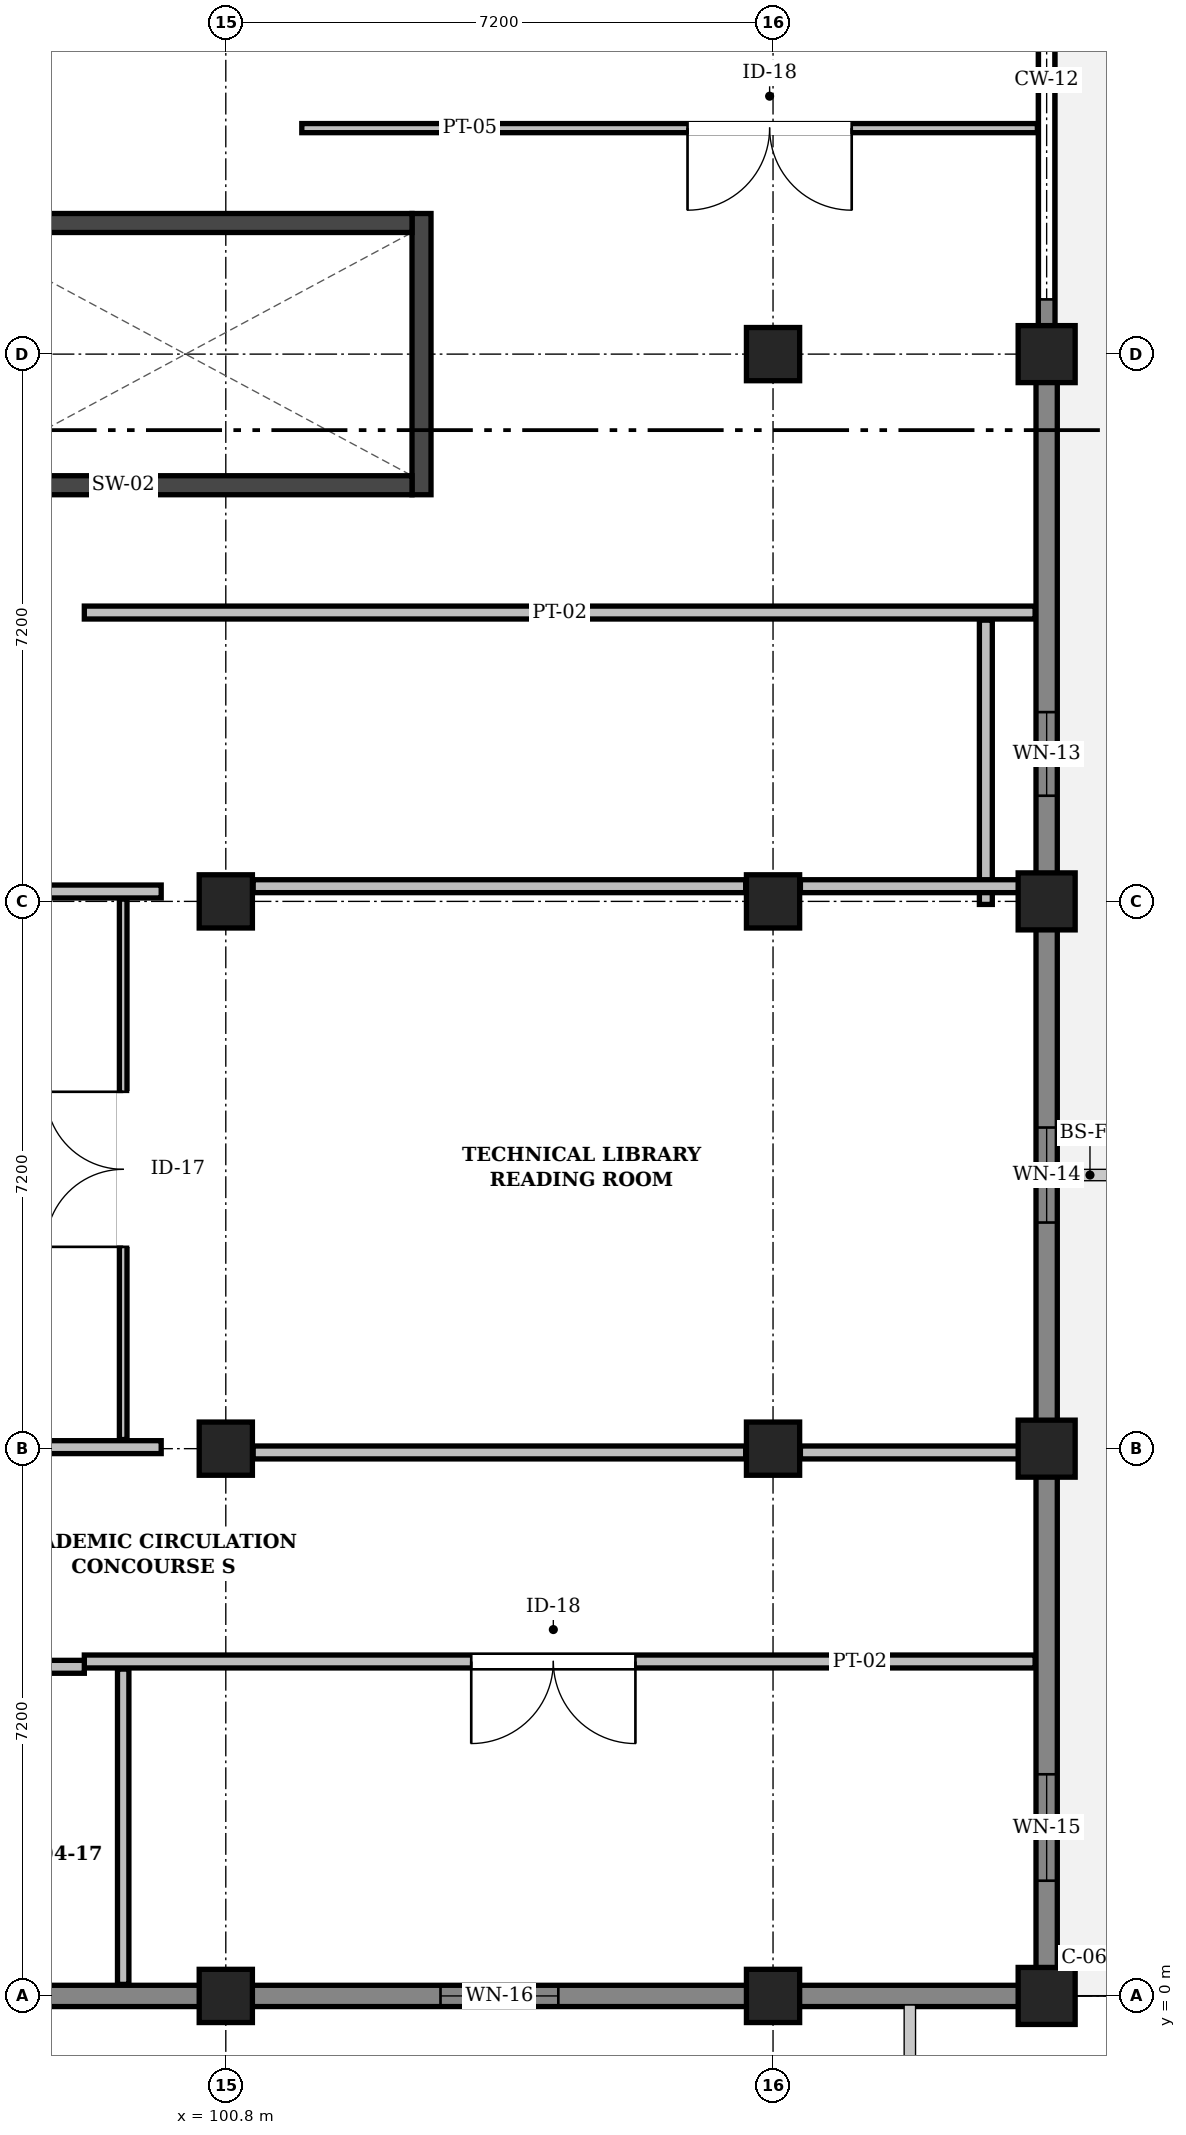
"""IFC4 building model, lengths in metres.
Left out: names, types, materials, properties, quantities, classifications, styles, units other than length and angle.
Written with IfcOpenShell. Run it as: python <this file> out.ifc"""

import sys

from ifc_helpers import new_model, si_unit, direction, frame, frame_2d, origin, origin_2d, place, context, subcontext, project, spatial, rectangle, extrude, element, fill, save


model = new_model("IFC4")
c1 = context("Model", 3, precision=1e-05, world=origin(), true_north=direction((0.0, 1.0)))
c2 = subcontext(c1, "Body", "Model", "MODEL_VIEW")
j1 = project(units=[si_unit("LENGTHUNIT", "METRE"), si_unit("PLANEANGLEUNIT", "RADIAN")], contexts=[c1])
p1 = place(None, origin())
s1 = spatial("IfcSite", under=j1, at=p1, CompositionType="ELEMENT")
p2 = place(p1, origin())
s2 = spatial("IfcBuilding", under=s1, at=p2, CompositionType="ELEMENT")
p3 = place(p2, frame((0.0, 0.0, 18.9)))
s3 = spatial("IfcBuildingStorey", under=s2, at=p3, CompositionType="ELEMENT", Elevation=18.9)
for number, where, z_axis, x_axis in (
    (1, (100.8, 0.0, 0.0), (0.0, 0.0, 1.0), (1.0, 0.0, 0.0)),
    (2, (100.8, 7.2, 0.0), (0.0, 0.0, 1.0), (1.0, 0.0, 0.0)),
    (3, (100.8, 14.4, 0.0), (0.0, 0.0, 1.0), (1.0, 0.0, 0.0)),
    (4, (108.0, 0.0, 0.0), (0.0, 0.0, 1.0), (1.0, 0.0, 0.0)),
    (5, (108.0, 7.2, 0.0), (0.0, 0.0, 1.0), (1.0, 0.0, 0.0)),
    (6, (108.0, 14.4, 0.0), (0.0, 0.0, 1.0), (1.0, 0.0, 0.0)),
    (7, (108.0, 21.6, 0.0), (0.0, 0.0, 1.0), (1.0, 0.0, 0.0)),
):
    element("IfcColumn", number, at=place(p3, frame(where, z_axis=z_axis, x_axis=x_axis)), inside=s3, PredefinedType="COLUMN", context=c2, shape_type="SweptSolid", body=[
        extrude(rectangle(XDim=0.7, YDim=0.7, at=origin_2d()), origin(), (0.0, 0.0, 1.0), 4.5),
    ])
for number, where, z_axis, x_axis in (
    (8, (111.6, 0.0, 0.0), (0.0, 0.0, 1.0), (1.0, 0.0, 0.0)),
    (9, (111.6, 7.2, 0.0), (0.0, 0.0, 1.0), (1.0, 0.0, 0.0)),
    (10, (111.6, 14.4, 0.0), (0.0, 0.0, 1.0), (1.0, 0.0, 0.0)),
    (11, (111.6, 21.6, 0.0), (0.0, 0.0, 1.0), (1.0, 0.0, 0.0)),
):
    element("IfcColumn", number, at=place(p3, frame(where, z_axis=z_axis, x_axis=x_axis)), inside=s3, PredefinedType="COLUMN", context=c2, shape_type="SweptSolid", body=[
        extrude(rectangle(XDim=0.75, YDim=0.75, at=origin_2d()), origin(), (0.0, 0.0, 1.0), 4.5),
    ])
p4 = place(p3, frame((111.6, 28.648, 0.0), z_axis=(0.0, 0.0, 1.0), x_axis=(0.0, -1.0, 0.0)))
e12 = element("IfcWall", 12, at=p4, inside=s3, PredefinedType="SOLIDWALL", context=c2, shape_type="SweptSolid", body=[
    extrude(rectangle(XDim=7.048, YDim=0.22, at=frame_2d((3.524, 0.0))), origin(), (0.0, 0.0, 1.0), 1.24),
])
p5 = place(p3, frame((111.6, 21.6, 0.0), z_axis=(0.0, 0.0, 1.0), x_axis=(0.0, -1.0, 0.0)))
e13 = element("IfcWall", 13, at=p5, inside=s3, PredefinedType="SOLIDWALL", context=c2, shape_type="SweptSolid", body=[
    extrude(rectangle(XDim=7.2, YDim=0.28, at=frame_2d((3.6, 0.0))), origin(), (0.0, 0.0, 1.0), 4.22),
])
p6 = place(p5, frame((4.71, 0.0, 0.95)))
e14 = element("IfcOpeningElement", 14, at=p6, cuts=e13, PredefinedType="OPENING", context=c2, shape_type="SweptSolid", body=[
    extrude(rectangle(XDim=1.1, YDim=1.55, at=frame_2d((0.55, 0.775))), frame((0.0, 0.152, 0.0), z_axis=(0.0, -1.0, 0.0), x_axis=(1.0, 0.0, 0.0)), (0.0, 0.0, 1.0), 0.304),
])
p7 = place(p3, frame((111.6, 14.4, 0.0), z_axis=(0.0, 0.0, 1.0), x_axis=(0.0, -1.0, 0.0)))
e15 = element("IfcWall", 15, at=p7, inside=s3, PredefinedType="SOLIDWALL", context=c2, shape_type="SweptSolid", body=[
    extrude(rectangle(XDim=7.2, YDim=0.28, at=frame_2d((3.6, 0.0))), origin(), (0.0, 0.0, 1.0), 4.22),
])
p8 = place(p7, frame((2.975, 0.0, 0.95)))
e16 = element("IfcOpeningElement", 16, at=p8, cuts=e15, PredefinedType="OPENING", context=c2, shape_type="SweptSolid", body=[
    extrude(rectangle(XDim=1.25, YDim=1.55, at=frame_2d((0.625, 0.775))), frame((0.0, 0.152, 0.0), z_axis=(0.0, -1.0, 0.0), x_axis=(1.0, 0.0, 0.0)), (0.0, 0.0, 1.0), 0.304),
])
p9 = place(p3, frame((111.6, 7.2, 0.0), z_axis=(0.0, 0.0, 1.0), x_axis=(0.0, -1.0, 0.0)))
e17 = element("IfcWall", 17, at=p9, inside=s3, PredefinedType="SOLIDWALL", context=c2, shape_type="SweptSolid", body=[
    extrude(rectangle(XDim=7.048, YDim=0.28, at=frame_2d((3.524, 0.0))), origin(), (0.0, 0.0, 1.0), 4.22),
])
p10 = place(p9, frame((4.284, 0.0, 0.95)))
e18 = element("IfcOpeningElement", 18, at=p10, cuts=e17, PredefinedType="OPENING", context=c2, shape_type="SweptSolid", body=[
    extrude(rectangle(XDim=1.4, YDim=1.55, at=frame_2d((0.7, 0.775))), frame((0.0, 0.152, 0.0), z_axis=(0.0, -1.0, 0.0), x_axis=(1.0, 0.0, 0.0)), (0.0, 0.0, 1.0), 0.304),
])
p11 = place(p3, frame((111.75, 0.0, 0.0), z_axis=(0.0, 0.0, 1.0), x_axis=(-1.0, 0.0, 0.0)))
e19 = element("IfcWall", 19, at=p11, inside=s3, PredefinedType="SOLIDWALL", context=c2, shape_type="SweptSolid", body=[
    extrude(rectangle(XDim=3.75, YDim=0.28, at=frame_2d((1.875, 0.0))), origin(), (0.0, 0.0, 1.0), 4.22),
])
p12 = place(p3, frame((108.0, 0.0, 0.0), z_axis=(0.0, 0.0, 1.0), x_axis=(-1.0, 0.0, 0.0)))
e20 = element("IfcWall", 20, at=p12, inside=s3, PredefinedType="SOLIDWALL", context=c2, shape_type="SweptSolid", body=[
    extrude(rectangle(XDim=7.2, YDim=0.28, at=frame_2d((3.6, 0.0))), origin(), (0.0, 0.0, 1.0), 4.22),
])
p13 = place(p12, frame((2.825, 0.0, 0.95)))
e21 = element("IfcOpeningElement", 21, at=p13, cuts=e20, PredefinedType="OPENING", context=c2, shape_type="SweptSolid", body=[
    extrude(rectangle(XDim=1.55, YDim=1.55, at=frame_2d((0.775, 0.775))), frame((0.0, 0.152, 0.0), z_axis=(0.0, -1.0, 0.0), x_axis=(1.0, 0.0, 0.0)), (0.0, 0.0, 1.0), 0.304),
])
p14 = place(p3, frame((100.8, 0.0, 0.0), z_axis=(0.0, 0.0, 1.0), x_axis=(-1.0, 0.0, 0.0)))
e22 = element("IfcWall", 22, at=p14, inside=s3, PredefinedType="SOLIDWALL", context=c2, shape_type="SweptSolid", body=[
    extrude(rectangle(XDim=7.2, YDim=0.28, at=frame_2d((3.6, 0.0))), origin(), (0.0, 0.0, 1.0), 4.22),
])
p15 = place(p14, frame((3.06, 0.0, 0.95)))
e23 = element("IfcOpeningElement", 23, at=p15, cuts=e22, PredefinedType="OPENING", context=c2, shape_type="SweptSolid", body=[
    extrude(rectangle(XDim=1.7, YDim=1.55, at=frame_2d((0.85, 0.775))), frame((0.0, 0.152, 0.0), z_axis=(0.0, -1.0, 0.0), x_axis=(1.0, 0.0, 0.0)), (0.0, 0.0, 1.0), 0.304),
])
p16 = place(p3, frame((103.375, 19.75, 0.0), z_axis=(0.0, 0.0, 1.0), x_axis=(0.0, 1.0, 0.0)))
e24 = element("IfcWall", 24, at=p16, inside=s3, PredefinedType="SHEAR", context=c2, shape_type="SweptSolid", body=[
    extrude(rectangle(XDim=3.7, YDim=0.25, at=frame_2d((1.85, 0.0))), origin(), (0.0, 0.0, 1.0), 4.25),
])
for number, where, z_axis, x_axis in (
    (25, (95.65, 19.875, 0.0), (0.0, 0.0, 1.0), (1.0, 0.0, 0.0)),
    (26, (95.65, 23.325, 0.0), (0.0, 0.0, 1.0), (1.0, 0.0, 0.0)),
):
    element("IfcWall", number, at=place(p3, frame(where, z_axis=z_axis, x_axis=x_axis)), inside=s3, PredefinedType="SHEAR", context=c2, shape_type="SweptSolid", body=[
        extrude(rectangle(XDim=7.6, YDim=0.25, at=frame_2d((3.8, 0.0))), origin(), (0.0, 0.0, 1.0), 4.25),
    ])
p17 = place(p3, frame((98.938, 18.2, 0.0), z_axis=(0.0, 0.0, 1.0), x_axis=(1.0, 0.0, 0.0)))
e27 = element("IfcWall", 27, at=p17, inside=s3, PredefinedType="PARTITIONING", context=c2, shape_type="SweptSolid", body=[
    extrude(rectangle(XDim=12.51, YDim=0.17, at=frame_2d((6.255, 0.0))), origin(), (0.0, 0.0, 1.0), 4.16),
])
p18 = place(p3, frame((110.8, 14.36, 0.0), z_axis=(0.0, 0.0, 1.0), x_axis=(0.0, 1.0, 0.0)))
e28 = element("IfcWall", 28, at=p18, inside=s3, PredefinedType="PARTITIONING", context=c2, shape_type="SweptSolid", body=[
    extrude(rectangle(XDim=3.74, YDim=0.17, at=frame_2d((1.87, 0.0))), origin(), (0.0, 0.0, 1.0), 4.16),
])
p19 = place(p3, frame((101.16, 14.6, 0.0), z_axis=(0.0, 0.0, 1.0), x_axis=(1.0, 0.0, 0.0)))
e29 = element("IfcWall", 29, at=p19, inside=s3, PredefinedType="PARTITIONING", context=c2, shape_type="SweptSolid", body=[
    extrude(rectangle(XDim=6.48, YDim=0.17, at=frame_2d((3.24, 0.0))), origin(), (0.0, 0.0, 1.0), 3.73),
])
p20 = place(p3, frame((108.36, 14.6, 0.0), z_axis=(0.0, 0.0, 1.0), x_axis=(1.0, 0.0, 0.0)))
e30 = element("IfcWall", 30, at=p20, inside=s3, PredefinedType="PARTITIONING", context=c2, shape_type="SweptSolid", body=[
    extrude(rectangle(XDim=3.088, YDim=0.17, at=frame_2d((1.544, 0.0))), origin(), (0.0, 0.0, 1.0), 3.73),
])
p21 = place(p3, frame((93.96, 14.53, 0.0), z_axis=(0.0, 0.0, 1.0), x_axis=(1.0, 0.0, 0.0)))
e31 = element("IfcWall", 31, at=p21, inside=s3, PredefinedType="PARTITIONING", context=c2, shape_type="SweptSolid", body=[
    extrude(rectangle(XDim=5.99, YDim=0.17, at=frame_2d((2.995, 0.0))), origin(), (0.0, 0.0, 1.0), 3.73),
])
p22 = place(p3, frame((98.938, 4.4, 0.0), z_axis=(0.0, 0.0, 1.0), x_axis=(1.0, 0.0, 0.0)))
e32 = element("IfcWall", 32, at=p22, inside=s3, PredefinedType="PARTITIONING", context=c2, shape_type="SweptSolid", body=[
    extrude(rectangle(XDim=12.51, YDim=0.17, at=frame_2d((6.255, 0.0))), origin(), (0.0, 0.0, 1.0), 4.16),
])
p23 = place(p22, frame((5.091, 0.0, 0.0)))
e33 = element("IfcOpeningElement", 33, at=p23, cuts=e32, PredefinedType="OPENING", context=c2, shape_type="SweptSolid", body=[
    extrude(rectangle(XDim=2.16, YDim=2.35, at=frame_2d((1.08, 1.175))), frame((0.0, 0.097, 0.0), z_axis=(0.0, -1.0, 0.0), x_axis=(1.0, 0.0, 0.0)), (0.0, 0.0, 1.0), 0.194),
])
p24 = place(p3, frame((101.16, 7.15, 0.0), z_axis=(0.0, 0.0, 1.0), x_axis=(1.0, 0.0, 0.0)))
e34 = element("IfcWall", 34, at=p24, inside=s3, PredefinedType="PARTITIONING", context=c2, shape_type="SweptSolid", body=[
    extrude(rectangle(XDim=6.48, YDim=0.17, at=frame_2d((3.24, 0.0))), origin(), (0.0, 0.0, 1.0), 3.73),
])
p25 = place(p3, frame((108.36, 7.15, 0.0), z_axis=(0.0, 0.0, 1.0), x_axis=(1.0, 0.0, 0.0)))
e35 = element("IfcWall", 35, at=p25, inside=s3, PredefinedType="PARTITIONING", context=c2, shape_type="SweptSolid", body=[
    extrude(rectangle(XDim=3.088, YDim=0.17, at=frame_2d((1.544, 0.0))), origin(), (0.0, 0.0, 1.0), 3.73),
])
p26 = place(p3, frame((93.96, 7.22, 0.0), z_axis=(0.0, 0.0, 1.0), x_axis=(1.0, 0.0, 0.0)))
e36 = element("IfcWall", 36, at=p26, inside=s3, PredefinedType="PARTITIONING", context=c2, shape_type="SweptSolid", body=[
    extrude(rectangle(XDim=5.99, YDim=0.17, at=frame_2d((2.995, 0.0))), origin(), (0.0, 0.0, 1.0), 3.73),
])
p27 = place(p3, frame((94.95, 4.33, 0.0), z_axis=(0.0, 0.0, 1.0), x_axis=(1.0, 0.0, 0.0)))
e37 = element("IfcWall", 37, at=p27, inside=s3, PredefinedType="PARTITIONING", context=c2, shape_type="SweptSolid", body=[
    extrude(rectangle(XDim=3.989, YDim=0.17, at=frame_2d((1.994, 0.0))), origin(), (0.0, 0.0, 1.0), 4.16),
])
p28 = place(p27, frame((1.214, 0.0, 0.0)))
e38 = element("IfcOpeningElement", 38, at=p28, cuts=e37, PredefinedType="OPENING", context=c2, shape_type="SweptSolid", body=[
    extrude(rectangle(XDim=1.56, YDim=2.26, at=frame_2d((0.78, 1.13))), frame((0.0, 0.097, 0.0), z_axis=(0.0, -1.0, 0.0), x_axis=(1.0, 0.0, 0.0)), (0.0, 0.0, 1.0), 0.194),
])
p29 = place(p3, frame((99.45, 7.32, 0.0), z_axis=(0.0, 0.0, 1.0), x_axis=(0.0, 1.0, 0.0)))
e39 = element("IfcWall", 39, at=p29, inside=s3, PredefinedType="PARTITIONING", context=c2, shape_type="SweptSolid", body=[
    extrude(rectangle(XDim=7.11, YDim=0.1, at=frame_2d((3.555, 0.0))), origin(), (0.0, 0.0, 1.0), 4.16),
])
p30 = place(p29, frame((2.535, 0.0, 0.0)))
e40 = element("IfcOpeningElement", 40, at=p30, cuts=e39, PredefinedType="OPENING", context=c2, shape_type="SweptSolid", body=[
    extrude(rectangle(XDim=2.04, YDim=2.34, at=frame_2d((1.02, 1.17))), frame((0.0, 0.062, 0.0), z_axis=(0.0, -1.0, 0.0), x_axis=(1.0, 0.0, 0.0)), (0.0, 0.0, 1.0), 0.124),
])
p31 = place(p3, frame((99.45, 0.152, 0.0), z_axis=(0.0, 0.0, 1.0), x_axis=(0.0, 1.0, 0.0)))
e41 = element("IfcWall", 41, at=p31, inside=s3, PredefinedType="PARTITIONING", context=c2, shape_type="SweptSolid", body=[
    extrude(rectangle(XDim=4.148, YDim=0.15, at=frame_2d((2.074, 0.0))), origin(), (0.0, 0.0, 1.0), 4.16),
])
p32 = place(p3, frame((101.8, 24.573, 0.0), z_axis=(0.0, 0.0, 1.0), x_axis=(1.0, 0.0, 0.0)))
e42 = element("IfcWall", 42, at=p32, inside=s3, PredefinedType="PARTITIONING", context=c2, shape_type="SweptSolid", body=[
    extrude(rectangle(XDim=9.678, YDim=0.12, at=frame_2d((4.839, 0.0))), origin(), (0.0, 0.0, 1.0), 4.16),
])
p33 = place(p32, frame((5.075, 0.0, 0.0)))
e43 = element("IfcOpeningElement", 43, at=p33, cuts=e42, PredefinedType="OPENING", context=c2, shape_type="SweptSolid", body=[
    extrude(rectangle(XDim=2.16, YDim=2.35, at=frame_2d((1.08, 1.175))), frame((0.0, 0.072, 0.0), z_axis=(0.0, -1.0, 0.0), x_axis=(1.0, 0.0, 0.0)), (0.0, 0.0, 1.0), 0.144),
])
p34 = place(p6, origin())
e44 = element("IfcWindow", 44, at=p34, inside=s3, PartitioningType="SINGLE_PANEL", PredefinedType="WINDOW", context=c2, shape_type="SweptSolid", body=[
    extrude(rectangle(XDim=1.1, YDim=1.55, at=frame_2d((0.55, 0.775))), frame((0.0, 0.03, 0.0), z_axis=(0.0, -1.0, 0.0), x_axis=(1.0, 0.0, 0.0)), (0.0, 0.0, 1.0), 0.06),
])
fill(e14, e44)
p35 = place(p8, origin())
e45 = element("IfcWindow", 45, at=p35, inside=s3, PartitioningType="SINGLE_PANEL", PredefinedType="WINDOW", context=c2, shape_type="SweptSolid", body=[
    extrude(rectangle(XDim=1.25, YDim=1.55, at=frame_2d((0.625, 0.775))), frame((0.0, 0.03, 0.0), z_axis=(0.0, -1.0, 0.0), x_axis=(1.0, 0.0, 0.0)), (0.0, 0.0, 1.0), 0.06),
])
fill(e16, e45)
p36 = place(p10, origin())
e46 = element("IfcWindow", 46, at=p36, inside=s3, PartitioningType="SINGLE_PANEL", PredefinedType="WINDOW", context=c2, shape_type="SweptSolid", body=[
    extrude(rectangle(XDim=1.4, YDim=1.55, at=frame_2d((0.7, 0.775))), frame((0.0, 0.03, 0.0), z_axis=(0.0, -1.0, 0.0), x_axis=(1.0, 0.0, 0.0)), (0.0, 0.0, 1.0), 0.06),
])
fill(e18, e46)
p37 = place(p13, origin())
e47 = element("IfcWindow", 47, at=p37, inside=s3, PartitioningType="SINGLE_PANEL", PredefinedType="WINDOW", context=c2, shape_type="SweptSolid", body=[
    extrude(rectangle(XDim=1.55, YDim=1.55, at=frame_2d((0.775, 0.775))), frame((0.0, 0.03, 0.0), z_axis=(0.0, -1.0, 0.0), x_axis=(1.0, 0.0, 0.0)), (0.0, 0.0, 1.0), 0.06),
])
fill(e21, e47)
p38 = place(p23, frame((2.16, 0.0, 0.0), z_axis=(0.0, 0.0, 1.0), x_axis=(-1.0, 0.0, 0.0)))
e48 = element("IfcDoor", 48, at=p38, inside=s3, OperationType="DOUBLE_DOOR_SINGLE_SWING", PredefinedType="DOOR", context=c2, shape_type="SweptSolid", body=[
    extrude(rectangle(XDim=2.16, YDim=2.35, at=frame_2d((1.08, 1.175))), frame((0.0, 0.025, 0.0), z_axis=(0.0, -1.0, 0.0), x_axis=(1.0, 0.0, 0.0)), (0.0, 0.0, 1.0), 0.05),
])
fill(e33, e48)
p39 = place(p30, origin())
e49 = element("IfcDoor", 49, at=p39, inside=s3, OperationType="DOUBLE_DOOR_SINGLE_SWING", PredefinedType="DOOR", context=c2, shape_type="SweptSolid", body=[
    extrude(rectangle(XDim=2.04, YDim=2.34, at=frame_2d((1.02, 1.17))), frame((0.0, 0.025, 0.0), z_axis=(0.0, -1.0, 0.0), x_axis=(1.0, 0.0, 0.0)), (0.0, 0.0, 1.0), 0.05),
])
fill(e40, e49)
p40 = place(p33, frame((2.16, 0.0, 0.0), z_axis=(0.0, 0.0, 1.0), x_axis=(-1.0, 0.0, 0.0)))
e50 = element("IfcDoor", 50, at=p40, inside=s3, OperationType="DOUBLE_DOOR_SINGLE_SWING", PredefinedType="DOOR", context=c2, shape_type="SweptSolid", body=[
    extrude(rectangle(XDim=2.16, YDim=2.35, at=frame_2d((1.08, 1.175))), frame((0.0, 0.025, 0.0), z_axis=(0.0, -1.0, 0.0), x_axis=(1.0, 0.0, 0.0)), (0.0, 0.0, 1.0), 0.05),
])
fill(e43, e50)
save(model, sys.argv[1])
